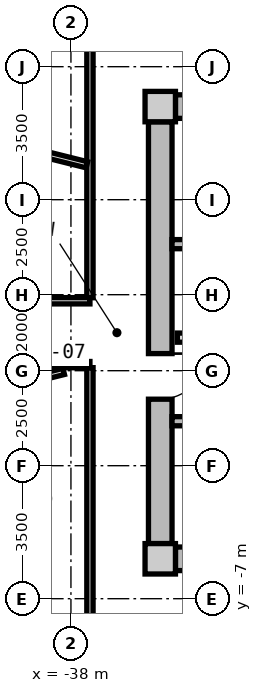
"""IFC4 building model, lengths in metres.
Left out: names, types, materials, properties, quantities, classifications, styles, units other than length and angle.
Written with IfcOpenShell. Run it as: python <this file> out.ifc"""

import sys

from ifc_helpers import new_model, si_unit, direction, frame, frame_2d, origin, origin_2d, place, context, subcontext, project, spatial, rectangle, extrude, source, transform, mapped, element, fill, save


model = new_model("IFC4")
c1 = context("Model", 3, precision=1e-05, world=origin(), true_north=direction((0.0, 1.0)))
c2 = subcontext(c1, "Body", "Model", "MODEL_VIEW")
j1 = project(units=[si_unit("LENGTHUNIT", "METRE"), si_unit("PLANEANGLEUNIT", "RADIAN")], contexts=[c1])
p1 = place(None, origin())
s1 = spatial("IfcSite", under=j1, at=p1, CompositionType="ELEMENT")
p2 = place(p1, origin())
s2 = spatial("IfcBuilding", under=s1, at=p2, CompositionType="ELEMENT")
p3 = place(p2, frame((0.0, 0.0, 177.0)))
s3 = spatial("IfcBuildingStorey", under=s2, at=p3, CompositionType="ELEMENT", Elevation=177.0)
m1 = source(origin(), c2, "Body", "SweptSolid", [
    extrude(rectangle(XDim=0.8, YDim=0.8, at=origin_2d()), origin(), (0.0, 0.0, 1.0), 3.05),
])
for number, where, z_axis, x_axis in (
    (1, (-35.65, -5.95, 0.0), (0.0, 0.0, 1.0), (1.0, 0.0, 0.0)),
    (2, (-35.65, 5.95, 0.0), (0.0, 0.0, 1.0), (1.0, 0.0, 0.0)),
):
    element("IfcColumn", number, at=place(p3, frame(where, z_axis=z_axis, x_axis=x_axis)), inside=s3, PredefinedType="COLUMN", context=c2, shape_type="MappedRepresentation", body=[
        mapped(m1, transform((0.0, 0.0, 0.0), x_axis=(1.0, 0.0, 0.0), y_axis=(0.0, 1.0, 0.0), z_axis=(0.0, 0.0, 1.0), scale=1.0)),
    ])
m2 = source(origin(), c2, "Body", "SweptSolid", [
    extrude(rectangle(XDim=14.5, YDim=0.62, at=frame_2d((7.25, 0.0))), origin(), (0.0, 0.0, 1.0), 2.81),
])
for number, where, z_axis, x_axis in (
    (3, (-35.25, 5.95, 0.0), (0.0, 0.0, 1.0), (1.0, 0.0, 0.0)),
    (4, (-20.75, -5.95, 0.0), (0.0, 0.0, 1.0), (-1.0, 0.0, 0.0)),
):
    element("IfcWall", number, at=place(p3, frame(where, z_axis=z_axis, x_axis=x_axis)), inside=s3, PredefinedType="SHEAR", context=c2, shape_type="MappedRepresentation", body=[
        mapped(m2, transform((0.0, 0.0, 0.0), x_axis=(1.0, 0.0, 0.0), y_axis=(0.0, 1.0, 0.0), z_axis=(0.0, 0.0, 1.0), scale=1.0)),
    ])
m3 = source(origin(), c2, "Body", "SweptSolid", [
    extrude(rectangle(XDim=11.1, YDim=0.62, at=frame_2d((5.55, 0.0))), origin(), (0.0, 0.0, 1.0), 2.81),
])
p4 = place(p3, frame((-35.65, -5.55, 0.0), z_axis=(0.0, 0.0, 1.0), x_axis=(0.0, 1.0, 0.0)))
e5 = element("IfcWall", 5, at=p4, inside=s3, PredefinedType="SHEAR", context=c2, shape_type="MappedRepresentation", body=[
    mapped(m3, transform((0.0, 0.0, 0.0), x_axis=(1.0, 0.0, 0.0), y_axis=(0.0, 1.0, 0.0), z_axis=(0.0, 0.0, 1.0), scale=1.0)),
])
p5 = place(p4, frame((3.8, 0.0, 0.0)))
e6 = element("IfcOpeningElement", 6, at=p5, cuts=e5, PredefinedType="OPENING", context=c2, shape_type="SweptSolid", body=[
    extrude(rectangle(XDim=1.2, YDim=2.15, at=frame_2d((0.6, 1.075))), frame((0.0, 0.32, 0.0), z_axis=(0.0, -1.0, 0.0), x_axis=(1.0, 0.0, 0.0)), (0.0, 0.0, 1.0), 0.64),
])
m4 = source(origin(), c2, "Body", "SweptSolid", [
    extrude(rectangle(XDim=7.88, YDim=0.24, at=frame_2d((3.94, 0.0))), origin(), (0.0, 0.0, 1.0), 2.81),
])
p6 = place(p3, frame((-35.34, 2.33, 0.0), z_axis=(0.0, 0.0, 1.0), x_axis=(1.0, 0.0, 0.0)))
e7 = element("IfcWall", 7, at=p6, inside=s3, PredefinedType="PARTITIONING", context=c2, shape_type="MappedRepresentation", body=[
    mapped(m4, transform((0.0, 0.0, 0.0), x_axis=(1.0, 0.0, 0.0), y_axis=(0.0, 1.0, 0.0), z_axis=(0.0, 0.0, 1.0), scale=1.0)),
])
p7 = place(p3, frame((-35.34, -2.33, 0.0), z_axis=(0.0, 0.0, 1.0), x_axis=(1.0, 0.0, 0.0)))
e8 = element("IfcWall", 8, at=p7, inside=s3, PredefinedType="PARTITIONING", context=c2, shape_type="MappedRepresentation", body=[
    mapped(m4, transform((0.0, 0.0, 0.0), x_axis=(1.0, 0.0, 0.0), y_axis=(0.0, 1.0, 0.0), z_axis=(0.0, 0.0, 1.0), scale=1.0)),
])
p8 = place(p7, frame((1.0, 0.0, 0.0)))
e9 = element("IfcOpeningElement", 9, at=p8, cuts=e8, PredefinedType="OPENING", context=c2, shape_type="SweptSolid", body=[
    extrude(rectangle(XDim=1.1, YDim=2.15, at=frame_2d((0.55, 1.075))), frame((0.0, 0.13, 0.0), z_axis=(0.0, -1.0, 0.0), x_axis=(1.0, 0.0, 0.0)), (0.0, 0.0, 1.0), 0.26),
])
m5 = source(origin(), c2, "Body", "SweptSolid", [
    extrude(rectangle(XDim=7.62, YDim=0.24, at=frame_2d((3.81, 0.0))), origin(), (0.0, 0.0, 1.0), 2.795),
])
p9 = place(p3, frame((-35.2, -0.13, 0.0), z_axis=(0.0, 0.0, 1.0), x_axis=(1.0, 0.0, 0.0)))
e10 = element("IfcWall", 10, at=p9, inside=s3, PredefinedType="PARTITIONING", context=c2, shape_type="MappedRepresentation", body=[
    mapped(m5, transform((0.0, 0.0, 0.0), x_axis=(1.0, 0.0, 0.0), y_axis=(0.0, 1.0, 0.0), z_axis=(0.0, 0.0, 1.0), scale=1.0)),
])
p10 = place(p9, frame((6.22, 0.0, 0.0)))
e11 = element("IfcOpeningElement", 11, at=p10, cuts=e10, PredefinedType="OPENING", context=c2, shape_type="SweptSolid", body=[
    extrude(rectangle(XDim=1.0, YDim=2.1, at=frame_2d((0.5, 1.05))), frame((0.0, 0.13, 0.0), z_axis=(0.0, -1.0, 0.0), x_axis=(1.0, 0.0, 0.0)), (0.0, 0.0, 1.0), 0.26),
])
p11 = place(p9, frame((2.4, 0.0, 0.0)))
e12 = element("IfcOpeningElement", 12, at=p11, cuts=e10, PredefinedType="OPENING", context=c2, shape_type="SweptSolid", body=[
    extrude(rectangle(XDim=1.0, YDim=2.1, at=frame_2d((0.5, 1.05))), frame((0.0, 0.13, 0.0), z_axis=(0.0, -1.0, 0.0), x_axis=(1.0, 0.0, 0.0)), (0.0, 0.0, 1.0), 0.26),
])
m6 = source(origin(), c2, "Body", "SweptSolid", [
    extrude(rectangle(XDim=6.88, YDim=0.165, at=frame_2d((3.44, 0.0))), origin(), (0.0, 0.0, 1.0), 2.795),
])
for number, where, z_axis, x_axis in (
    (13, (-37.5, -7.8, 0.0), (0.0, 0.0, 1.0), (0.0, 1.0, 0.0)),
    (14, (-37.5, 0.92, 0.0), (0.0, 0.0, 1.0), (0.0, 1.0, 0.0)),
):
    element("IfcWall", number, at=place(p3, frame(where, z_axis=z_axis, x_axis=x_axis)), inside=s3, PredefinedType="PARTITIONING", context=c2, shape_type="MappedRepresentation", body=[
        mapped(m6, transform((0.0, 0.0, 0.0), x_axis=(1.0, 0.0, 0.0), y_axis=(0.0, 1.0, 0.0), z_axis=(0.0, 0.0, 1.0), scale=1.0)),
    ])
m7 = source(origin(), c2, "Body", "SweptSolid", [
    extrude(rectangle(XDim=6.193, YDim=0.165, at=frame_2d((3.096, 0.0))), origin(), (0.0, 0.0, 1.0), 2.345),
])
p12 = place(p3, frame((-37.58, 4.419, 0.0), z_axis=(0.0, 0.0, 1.0), x_axis=(-0.970309243466, 0.241867674657, 0.0)))
e15 = element("IfcWall", 15, at=p12, inside=s3, PredefinedType="PARTITIONING", context=c2, shape_type="MappedRepresentation", body=[
    mapped(m7, transform((0.0, 0.0, 0.0), x_axis=(1.0, 0.0, 0.0), y_axis=(0.0, 1.0, 0.0), z_axis=(0.0, 0.0, 1.0), scale=1.0)),
])
m8 = source(origin(), c2, "Body", "SweptSolid", [
    extrude(rectangle(XDim=5.564, YDim=0.165, at=frame_2d((2.782, 0.0))), origin(), (0.0, 0.0, 1.0), 2.345),
])
p13 = place(p3, frame((-38.19, -1.02, 0.0), z_axis=(0.0, 0.0, 1.0), x_axis=(-0.97031260977, -0.241854169533, 0.0)))
e16 = element("IfcWall", 16, at=p13, inside=s3, PredefinedType="PARTITIONING", context=c2, shape_type="MappedRepresentation", body=[
    mapped(m8, transform((0.0, 0.0, 0.0), x_axis=(1.0, 0.0, 0.0), y_axis=(0.0, 1.0, 0.0), z_axis=(0.0, 0.0, 1.0), scale=1.0)),
])
m9 = source(origin(), c2, "Body", "SweptSolid", [
    extrude(rectangle(XDim=6.139, YDim=0.165, at=frame_2d((3.069, 0.0))), origin(), (0.0, 0.0, 1.0), 2.795),
])
p14 = place(p3, frame((-43.639, 0.84, 0.0), z_axis=(0.0, 0.0, 1.0), x_axis=(1.0, 0.0, 0.0)))
e17 = element("IfcWall", 17, at=p14, inside=s3, PredefinedType="PARTITIONING", context=c2, shape_type="MappedRepresentation", body=[
    mapped(m9, transform((0.0, 0.0, 0.0), x_axis=(1.0, 0.0, 0.0), y_axis=(0.0, 1.0, 0.0), z_axis=(0.0, 0.0, 1.0), scale=1.0)),
])
p15 = place(p14, frame((2.594, 0.0, 0.0)))
e18 = element("IfcOpeningElement", 18, at=p15, cuts=e17, PredefinedType="OPENING", context=c2, shape_type="SweptSolid", body=[
    extrude(rectangle(XDim=0.95, YDim=2.1, at=frame_2d((0.475, 1.05))), frame((0.0, 0.093, 0.0), z_axis=(0.0, -1.0, 0.0), x_axis=(1.0, 0.0, 0.0)), (0.0, 0.0, 1.0), 0.185),
])
p16 = place(p3, frame((-37.5, -0.84, 0.0), z_axis=(0.0, 0.0, 1.0), x_axis=(-1.0, 0.0, 0.0)))
e19 = element("IfcWall", 19, at=p16, inside=s3, PredefinedType="PARTITIONING", context=c2, shape_type="MappedRepresentation", body=[
    mapped(m9, transform((0.0, 0.0, 0.0), x_axis=(1.0, 0.0, 0.0), y_axis=(0.0, 1.0, 0.0), z_axis=(0.0, 0.0, 1.0), scale=1.0)),
])
m10 = source(origin(), c2, "Body", "SweptSolid", [
    extrude(rectangle(XDim=1.2, YDim=2.15, at=frame_2d((0.6, 1.075))), frame((0.0, 0.025, 0.0), z_axis=(0.0, -1.0, 0.0), x_axis=(1.0, 0.0, 0.0)), (0.0, 0.0, 1.0), 0.05),
])
p17 = place(p5, frame((1.2, 0.0, 0.0), z_axis=(0.0, 0.0, 1.0), x_axis=(-1.0, 0.0, 0.0)))
e20 = element("IfcDoor", 20, at=p17, inside=s3, OperationType="SINGLE_SWING_LEFT", PredefinedType="DOOR", context=c2, shape_type="MappedRepresentation", body=[
    mapped(m10, transform((0.0, 0.0, 0.0), x_axis=(1.0, 0.0, 0.0), y_axis=(0.0, 1.0, 0.0), z_axis=(0.0, 0.0, 1.0), scale=1.0)),
])
fill(e6, e20)
save(model, sys.argv[1])
